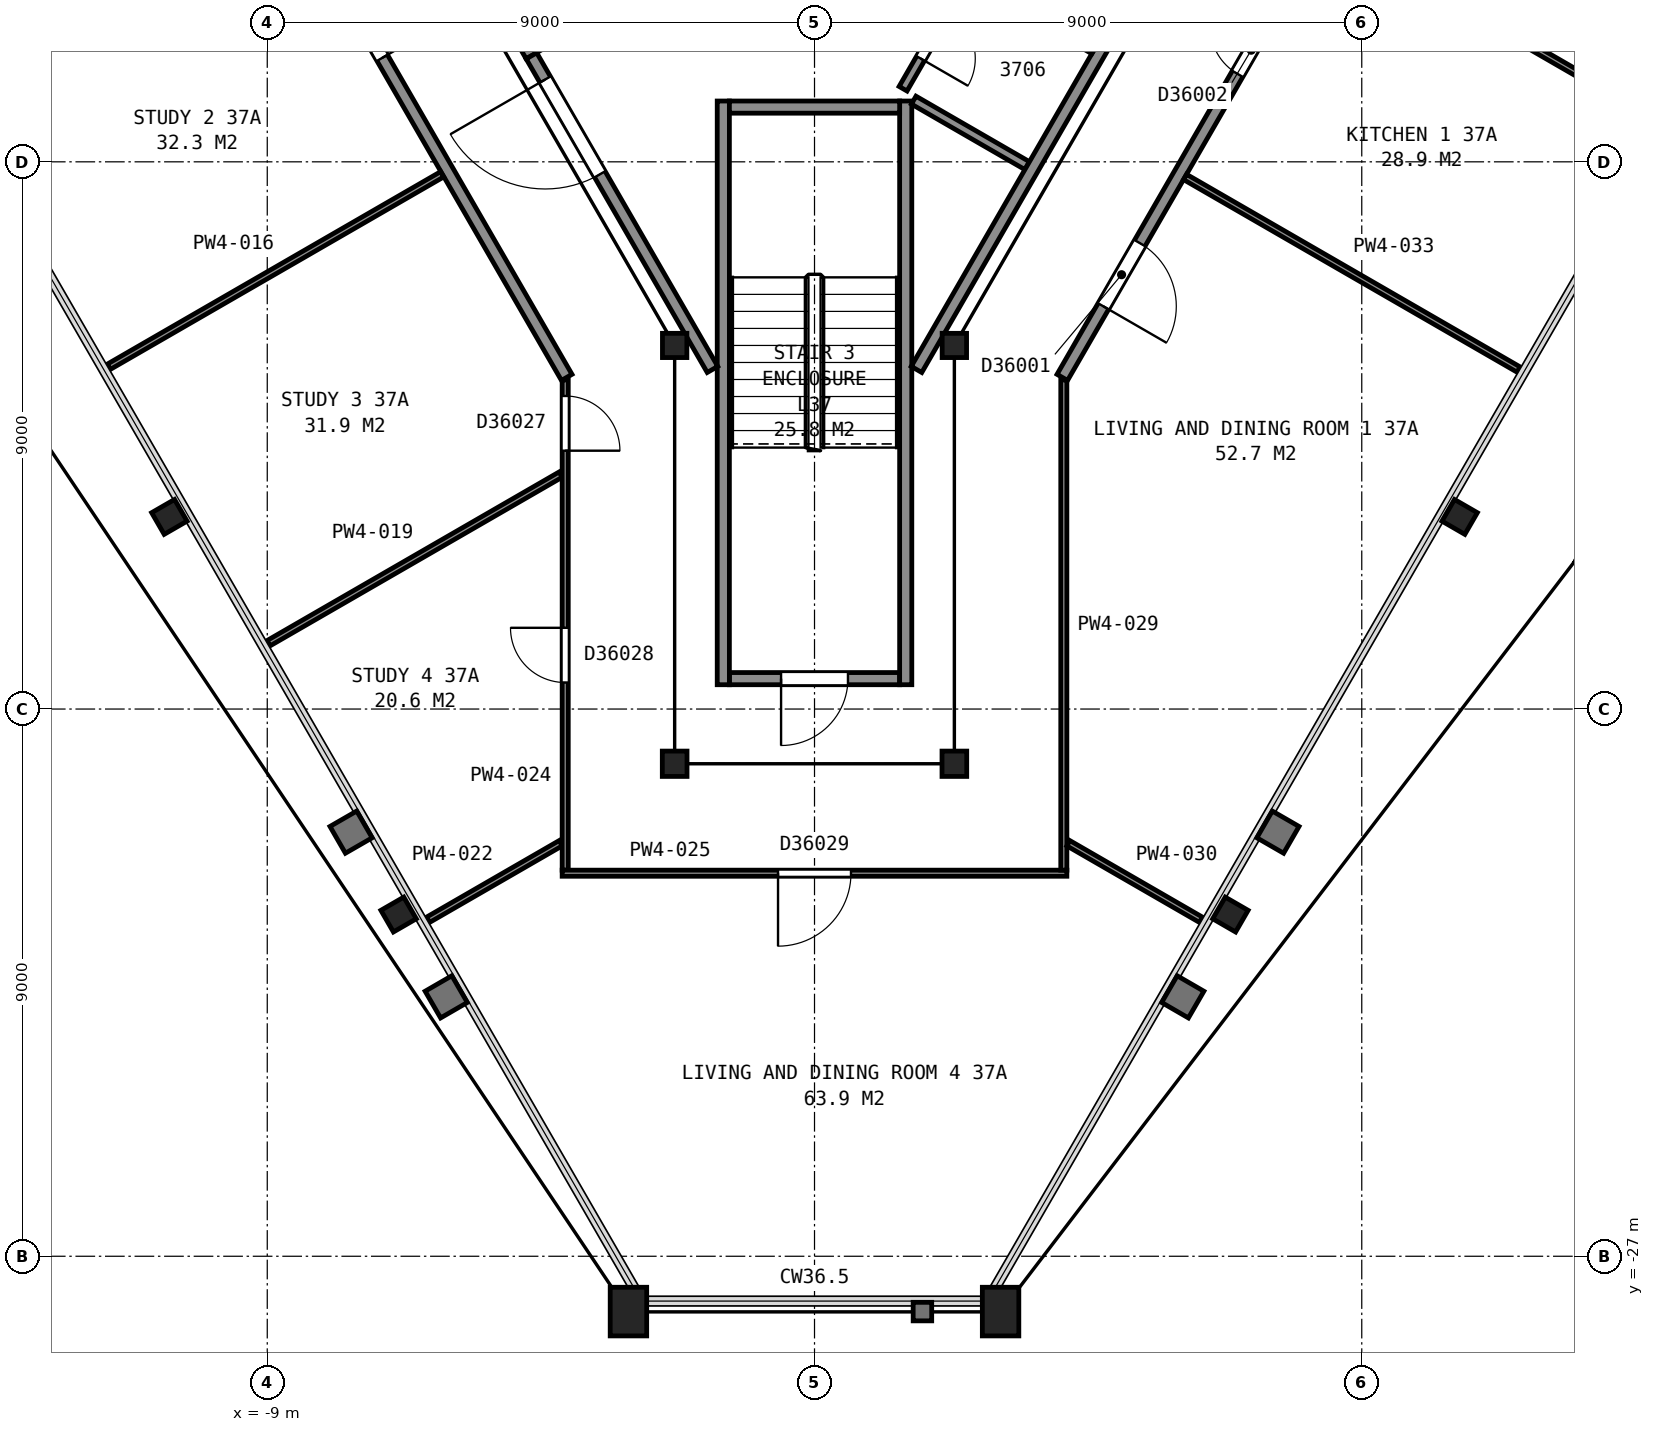
"""IFC4 building model, lengths in metres.
Left out: names, types, materials, properties, quantities, classifications, styles, units other than length and angle.
Written with IfcOpenShell. Run it as: python <this file> out.ifc"""

import sys

from ifc_helpers import new_model, si_unit, direction, frame, frame_2d, origin, origin_2d, place, context, subcontext, project, spatial, rectangle, hollow_rectangle, i_section, extrude, element, fill, save


model = new_model("IFC4")
c1 = context("Model", 3, precision=1e-05, world=origin(), true_north=direction((0.0, 1.0)))
c2 = subcontext(c1, "Body", "Model", "MODEL_VIEW")
j1 = project(units=[si_unit("LENGTHUNIT", "METRE"), si_unit("PLANEANGLEUNIT", "RADIAN")], contexts=[c1])
p1 = place(None, origin())
s1 = spatial("IfcSite", under=j1, at=p1, CompositionType="ELEMENT")
p2 = place(p1, origin())
s2 = spatial("IfcBuilding", under=s1, at=p2, CompositionType="ELEMENT")
p3 = place(p2, frame((0.0, 0.0, 152.5)))
s3 = spatial("IfcBuildingStorey", under=s2, at=p3, CompositionType="ELEMENT", Elevation=152.5)
p4 = place(p3, frame((-10.61, -14.84, 0.0), z_axis=(0.0, 0.0, 1.0), x_axis=(-0.5, 0.866025403784, 0.0)))
e1 = element("IfcColumn", 1, at=p4, inside=s3, PredefinedType="COLUMN", context=c2, shape_type="SweptSolid", body=[
    extrude(i_section(OverallWidth=0.411, OverallDepth=0.434, WebThickness=0.036, FlangeThickness=0.057, FilletRadius=0.015, at=origin_2d()), origin(), (0.0, 0.0, 1.0), 3.665),
])
p5 = place(p3, frame((-6.84, -21.38, 0.0), z_axis=(0.0, 0.0, 1.0), x_axis=(-0.5, 0.866025403784, 0.0)))
e2 = element("IfcColumn", 2, at=p5, inside=s3, PredefinedType="COLUMN", context=c2, shape_type="SweptSolid", body=[
    extrude(i_section(OverallWidth=0.411, OverallDepth=0.434, WebThickness=0.036, FlangeThickness=0.057, FilletRadius=0.015, at=origin_2d()), origin(), (0.0, 0.0, 1.0), 3.66),
])
for number, where, z_axis, x_axis in (
    (3, (-3.06, -27.91, 0.0), (0.0, 0.0, 1.0), (-1.0, 0.0, 0.0)),
    (4, (3.06, -27.91, 0.0), (0.0, 0.0, 1.0), (-1.0, 0.0, 0.0)),
):
    element("IfcColumn", number, at=place(p3, frame(where, z_axis=z_axis, x_axis=x_axis)), inside=s3, PredefinedType="COLUMN", context=c2, shape_type="SweptSolid", body=[
        extrude(hollow_rectangle(XDim=0.6, YDim=0.8, WallThickness=0.05, at=origin_2d()), origin(), (0.0, 0.0, 1.0), 3.635),
    ])
p6 = place(p3, frame((6.84, -21.38, 0.0), z_axis=(0.0, 0.0, 1.0), x_axis=(-0.5, -0.866025403784, 0.0)))
e5 = element("IfcColumn", 5, at=p6, inside=s3, PredefinedType="COLUMN", context=c2, shape_type="SweptSolid", body=[
    extrude(i_section(OverallWidth=0.411, OverallDepth=0.434, WebThickness=0.036, FlangeThickness=0.057, FilletRadius=0.015, at=origin_2d()), origin(), (0.0, 0.0, 1.0), 3.66),
])
p7 = place(p3, frame((10.61, -14.84, 0.0), z_axis=(0.0, 0.0, 1.0), x_axis=(-0.5, -0.866025403784, 0.0)))
e6 = element("IfcColumn", 6, at=p7, inside=s3, PredefinedType="COLUMN", context=c2, shape_type="SweptSolid", body=[
    extrude(i_section(OverallWidth=0.411, OverallDepth=0.434, WebThickness=0.036, FlangeThickness=0.057, FilletRadius=0.015, at=origin_2d()), origin(), (0.0, 0.0, 1.0), 3.665),
])
p8 = place(p3, frame((-2.3, -12.02, 0.0), z_axis=(0.0, 0.0, 1.0), x_axis=(1.0, 0.0, 0.0)))
e7 = element("IfcColumn", 7, at=p8, inside=s3, PredefinedType="COLUMN", context=c2, shape_type="SweptSolid", body=[
    extrude(i_section(OverallWidth=0.401, OverallDepth=0.399, WebThickness=0.025, FlangeThickness=0.04, FilletRadius=0.015, at=origin_2d()), origin(), (0.0, 0.0, 1.0), 3.7),
])
for number, where, z_axis, x_axis in (
    (8, (-2.3, -18.9, 0.0), (0.0, 0.0, 1.0), (-1.0, 0.0, 0.0)),
    (9, (2.3, -18.9, 0.0), (0.0, 0.0, 1.0), (-1.0, 0.0, 0.0)),
):
    element("IfcColumn", number, at=place(p3, frame(where, z_axis=z_axis, x_axis=x_axis)), inside=s3, PredefinedType="COLUMN", context=c2, shape_type="SweptSolid", body=[
        extrude(i_section(OverallWidth=0.406, OverallDepth=0.417, WebThickness=0.03, FlangeThickness=0.048, FilletRadius=0.015, at=origin_2d()), origin(), (0.0, 0.0, 1.0), 3.7),
    ])
p9 = place(p3, frame((2.3, -12.02, 0.0), z_axis=(0.0, 0.0, 1.0), x_axis=(1.0, 0.0, 0.0)))
e10 = element("IfcColumn", 10, at=p9, inside=s3, PredefinedType="COLUMN", context=c2, shape_type="SweptSolid", body=[
    extrude(i_section(OverallWidth=0.401, OverallDepth=0.399, WebThickness=0.025, FlangeThickness=0.04, FilletRadius=0.015, at=origin_2d()), origin(), (0.0, 0.0, 1.0), 3.7),
])
p10 = place(p3, frame((-1.4, -17.5, 0.0), z_axis=(0.0, 0.0, 1.0), x_axis=(1.0, 0.0, 0.0)))
e11 = element("IfcWall", 11, at=p10, inside=s3, PredefinedType="PARTITIONING", context=c2, shape_type="SweptSolid", body=[
    extrude(rectangle(XDim=2.8, YDim=0.2, at=frame_2d((1.4, 0.0))), origin(), (0.0, 0.0, 1.0), 3.45),
])
p11 = place(p10, frame((0.85, 0.0, 0.0)))
e12 = element("IfcOpeningElement", 12, at=p11, cuts=e11, PredefinedType="OPENING", context=c2, shape_type="SweptSolid", body=[
    extrude(rectangle(XDim=1.1, YDim=2.1, at=frame_2d((0.55, 1.05))), frame((0.0, 0.11, 0.0), z_axis=(0.0, -1.0, 0.0), x_axis=(1.0, 0.0, 0.0)), (0.0, 0.0, 1.0), 0.22),
])
for number, where, z_axis, x_axis in (
    (13, (1.5, -8.0, 0.0), (0.0, 0.0, 1.0), (0.0, -1.0, 0.0)),
    (14, (-1.5, -8.0, 0.0), (0.0, 0.0, 1.0), (0.0, -1.0, 0.0)),
):
    element("IfcWall", number, at=place(p3, frame(where, z_axis=z_axis, x_axis=x_axis)), inside=s3, PredefinedType="PARTITIONING", context=c2, shape_type="SweptSolid", body=[
        extrude(rectangle(XDim=9.6, YDim=0.2, at=frame_2d((4.8, 0.0))), origin(), (0.0, 0.0, 1.0), 3.45),
    ])
p12 = place(p3, frame((-1.4, -8.1, 0.0), z_axis=(0.0, 0.0, 1.0), x_axis=(1.0, 0.0, 0.0)))
e15 = element("IfcWall", 15, at=p12, inside=s3, PredefinedType="PARTITIONING", context=c2, shape_type="SweptSolid", body=[
    extrude(rectangle(XDim=2.8, YDim=0.2, at=frame_2d((1.4, 0.0))), origin(), (0.0, 0.0, 1.0), 3.45),
])
p13 = place(p3, frame((-4.62, -7.118, 0.0), z_axis=(0.0, 0.0, 1.0), x_axis=(0.866036909293, 0.499980071345, 0.0)))
e16 = element("IfcWall", 16, at=p13, inside=s3, PredefinedType="PARTITIONING", context=c2, shape_type="SweptSolid", body=[
    extrude(rectangle(XDim=1.75, YDim=0.2, at=frame_2d((0.875, 0.0))), origin(), (0.0, 0.0, 1.0), 3.7),
])
p14 = place(p3, frame((-4.656, -7.255, 0.0), z_axis=(0.0, 0.0, 1.0), x_axis=(-0.499990435942, 0.866030925526, 0.0)))
e17 = element("IfcWall", 17, at=p14, inside=s3, PredefinedType="PARTITIONING", context=c2, shape_type="SweptSolid", body=[
    extrude(rectangle(XDim=2.55, YDim=0.2, at=frame_2d((1.275, 0.0))), origin(), (0.0, 0.0, 1.0), 3.7),
])
p15 = place(p3, frame((-4.655, -7.257, 0.0), z_axis=(0.0, 0.0, 1.0), x_axis=(0.499966124405, -0.866044960985, 0.0)))
e18 = element("IfcWall", 18, at=p15, inside=s3, PredefinedType="PARTITIONING", context=c2, shape_type="SweptSolid", body=[
    extrude(rectangle(XDim=5.956, YDim=0.2, at=frame_2d((2.978, 0.0))), origin(), (0.0, 0.0, 1.0), 3.45),
])
p16 = place(p15, frame((0.45, 0.0, 0.0)))
e19 = element("IfcOpeningElement", 19, at=p16, cuts=e18, PredefinedType="OPENING", context=c2, shape_type="SweptSolid", body=[
    extrude(rectangle(XDim=1.8, YDim=2.1, at=frame_2d((0.9, 1.05))), frame((0.0, 0.11, 0.0), z_axis=(0.0, -1.0, 0.0), x_axis=(1.0, 0.0, 0.0)), (0.0, 0.0, 1.0), 0.22),
])
p17 = place(p3, frame((2.481, -6.022, 0.0), z_axis=(0.0, 0.0, 1.0), x_axis=(-0.499801470403, -0.866139994564, 0.0)))
e20 = element("IfcWall", 20, at=p17, inside=s3, PredefinedType="PARTITIONING", context=c2, shape_type="SweptSolid", body=[
    extrude(rectangle(XDim=2.051, YDim=0.15, at=frame_2d((1.025, 0.0))), origin(), (0.0, 0.0, 1.0), 3.45),
])
p18 = place(p17, frame((0.576, 0.0, 0.0)))
e21 = element("IfcOpeningElement", 21, at=p18, cuts=e20, PredefinedType="OPENING", context=c2, shape_type="SweptSolid", body=[
    extrude(rectangle(XDim=0.9, YDim=2.1, at=frame_2d((0.45, 1.05))), frame((0.0, 0.085, 0.0), z_axis=(0.0, -1.0, 0.0), x_axis=(1.0, 0.0, 0.0)), (0.0, 0.0, 1.0), 0.17),
])
p19 = place(p3, frame((1.631, -7.986, 0.0), z_axis=(0.0, 0.0, 1.0), x_axis=(0.866038426532, -0.499977443261, 0.0)))
e22 = element("IfcWall", 22, at=p19, inside=s3, PredefinedType="PARTITIONING", context=c2, shape_type="SweptSolid", body=[
    extrude(rectangle(XDim=2.155, YDim=0.15, at=frame_2d((1.077, 0.0))), origin(), (0.0, 0.0, 1.0), 3.45),
])
p20 = place(p3, frame((1.677, -12.415, 0.0), z_axis=(0.0, 0.0, 1.0), x_axis=(0.500054337157, 0.865994029939, 0.0)))
e23 = element("IfcWall", 23, at=p20, inside=s3, PredefinedType="PARTITIONING", context=c2, shape_type="SweptSolid", body=[
    extrude(rectangle(XDim=6.177, YDim=0.2, at=frame_2d((3.088, 0.0))), origin(), (0.0, 0.0, 1.0), 3.45),
])
p21 = place(p3, frame((2.454, -5.919, 0.0), z_axis=(0.0, 0.0, 1.0), x_axis=(0.866006523861, -0.500032699561, 0.0)))
e24 = element("IfcWall", 24, at=p21, inside=s3, PredefinedType="PARTITIONING", context=c2, shape_type="SweptSolid", body=[
    extrude(rectangle(XDim=2.475, YDim=0.15, at=frame_2d((1.237, 0.0))), origin(), (0.0, 0.0, 1.0), 3.45),
])
p22 = place(p3, frame((-14.23, -7.823, 0.0), z_axis=(0.0, 0.0, 1.0), x_axis=(0.866021249958, 0.50000719457, 0.0)))
e25 = element("IfcWall", 25, at=p22, inside=s3, PredefinedType="PARTITIONING", context=c2, shape_type="SweptSolid", body=[
    extrude(rectangle(XDim=6.333, YDim=0.1, at=frame_2d((3.167, 0.0))), origin(), (0.0, 0.0, 1.0), 2.713),
])
p23 = place(p3, frame((-4.075, -12.545, 0.0), z_axis=(0.0, 0.0, 1.0), x_axis=(-0.499999743747, 0.866025551732, 0.0)))
e26 = element("IfcWall", 26, at=p23, inside=s3, PredefinedType="PARTITIONING", context=c2, shape_type="SweptSolid", body=[
    extrude(rectangle(XDim=17.656, YDim=0.2, at=frame_2d((8.828, 0.0))), origin(), (0.0, 0.0, 1.0), 2.713),
])
p24 = place(p23, frame((10.08, 0.0, 0.0)))
e27 = element("IfcOpeningElement", 27, at=p24, cuts=e26, PredefinedType="OPENING", context=c2, shape_type="SweptSolid", body=[
    extrude(rectangle(XDim=0.9, YDim=2.1, at=frame_2d((0.45, 1.05))), frame((0.0, 0.11, 0.0), z_axis=(0.0, -1.0, 0.0), x_axis=(1.0, 0.0, 0.0)), (0.0, 0.0, 1.0), 0.22),
])
p25 = place(p23, frame((6.068, 0.0, 0.0)))
e28 = element("IfcOpeningElement", 28, at=p25, cuts=e26, PredefinedType="OPENING", context=c2, shape_type="SweptSolid", body=[
    extrude(rectangle(XDim=0.9, YDim=2.1, at=frame_2d((0.45, 1.05))), frame((0.0, 0.11, 0.0), z_axis=(0.0, -1.0, 0.0), x_axis=(1.0, 0.0, 0.0)), (0.0, 0.0, 1.0), 0.22),
])
p26 = place(p3, frame((-11.605, -12.37, 0.0), z_axis=(0.0, 0.0, 1.0), x_axis=(0.866017278078, 0.500014073873, 0.0)))
e29 = element("IfcWall", 29, at=p26, inside=s3, PredefinedType="PARTITIONING", context=c2, shape_type="SweptSolid", body=[
    extrude(rectangle(XDim=6.329, YDim=0.1, at=frame_2d((3.165, 0.0))), origin(), (0.0, 0.0, 1.0), 2.713),
])
p27 = place(p3, frame((-8.979, -16.918, 0.0), z_axis=(0.0, 0.0, 1.0), x_axis=(0.866046339293, 0.499963736882, 0.0)))
e30 = element("IfcWall", 30, at=p27, inside=s3, PredefinedType="PARTITIONING", context=c2, shape_type="SweptSolid", body=[
    extrude(rectangle(XDim=5.547, YDim=0.1, at=frame_2d((2.774, 0.0))), origin(), (0.0, 0.0, 1.0), 2.713),
])
p28 = place(p3, frame((-6.354, -21.465, 0.0), z_axis=(0.0, 0.0, 1.0), x_axis=(0.866061165757, 0.499938053331, 0.0)))
e31 = element("IfcWall", 31, at=p28, inside=s3, PredefinedType="PARTITIONING", context=c2, shape_type="SweptSolid", body=[
    extrude(rectangle(XDim=2.516, YDim=0.1, at=frame_2d((1.258, 0.0))), origin(), (0.0, 0.0, 1.0), 2.713),
])
p29 = place(p3, frame((-4.1, -20.65, 0.0), z_axis=(0.0, 0.0, 1.0), x_axis=(0.0, 1.0, 0.0)))
e32 = element("IfcWall", 32, at=p29, inside=s3, PredefinedType="PARTITIONING", context=c2, shape_type="SweptSolid", body=[
    extrude(rectangle(XDim=8.063, YDim=0.1, at=frame_2d((4.031, 0.0))), origin(), (0.0, 0.0, 1.0), 2.713),
])
p30 = place(p29, frame((6.899, 0.0, 0.0)))
e33 = element("IfcOpeningElement", 33, at=p30, cuts=e32, PredefinedType="OPENING", context=c2, shape_type="SweptSolid", body=[
    extrude(rectangle(XDim=0.9, YDim=2.1, at=frame_2d((0.45, 1.05))), frame((0.0, 0.06, 0.0), z_axis=(0.0, -1.0, 0.0), x_axis=(1.0, 0.0, 0.0)), (0.0, 0.0, 1.0), 0.12),
])
p31 = place(p29, frame((3.086, 0.0, 0.0)))
e34 = element("IfcOpeningElement", 34, at=p31, cuts=e32, PredefinedType="OPENING", context=c2, shape_type="SweptSolid", body=[
    extrude(rectangle(XDim=0.9, YDim=2.1, at=frame_2d((0.45, 1.05))), frame((0.0, 0.06, 0.0), z_axis=(0.0, -1.0, 0.0), x_axis=(1.0, 0.0, 0.0)), (0.0, 0.0, 1.0), 0.12),
])
p32 = place(p3, frame((4.15, -20.7, 0.0), z_axis=(0.0, 0.0, 1.0), x_axis=(-1.0, 0.0, 0.0)))
e35 = element("IfcWall", 35, at=p32, inside=s3, PredefinedType="PARTITIONING", context=c2, shape_type="SweptSolid", body=[
    extrude(rectangle(XDim=8.3, YDim=0.1, at=frame_2d((4.15, 0.0))), origin(), (0.0, 0.0, 1.0), 2.713),
])
p33 = place(p32, frame((3.55, 0.0, 0.0)))
e36 = element("IfcOpeningElement", 36, at=p33, cuts=e35, PredefinedType="OPENING", context=c2, shape_type="SweptSolid", body=[
    extrude(rectangle(XDim=1.2, YDim=2.1, at=frame_2d((0.6, 1.05))), frame((0.0, 0.06, 0.0), z_axis=(0.0, -1.0, 0.0), x_axis=(1.0, 0.0, 0.0)), (0.0, 0.0, 1.0), 0.12),
])
p34 = place(p3, frame((4.1, -20.65, 0.0), z_axis=(0.0, 0.0, 1.0), x_axis=(0.0, 1.0, 0.0)))
e37 = element("IfcWall", 37, at=p34, inside=s3, PredefinedType="PARTITIONING", context=c2, shape_type="SweptSolid", body=[
    extrude(rectangle(XDim=8.063, YDim=0.1, at=frame_2d((4.031, 0.0))), origin(), (0.0, 0.0, 1.0), 2.713),
])
p35 = place(p3, frame((4.175, -20.207, 0.0), z_axis=(0.0, 0.0, 1.0), x_axis=(0.866061165757, -0.499938053331, 0.0)))
e38 = element("IfcWall", 38, at=p35, inside=s3, PredefinedType="PARTITIONING", context=c2, shape_type="SweptSolid", body=[
    extrude(rectangle(XDim=2.516, YDim=0.1, at=frame_2d((1.258, 0.0))), origin(), (0.0, 0.0, 1.0), 2.713),
])
p36 = place(p3, frame((12.928, 2.789, 0.0), z_axis=(0.0, 0.0, 1.0), x_axis=(-0.499997769292, -0.86602669168, 0.0)))
e39 = element("IfcWall", 39, at=p36, inside=s3, PredefinedType="PARTITIONING", context=c2, shape_type="SweptSolid", body=[
    extrude(rectangle(XDim=17.706, YDim=0.2, at=frame_2d((8.853, 0.0))), origin(), (0.0, 0.0, 1.0), 2.713),
])
p37 = place(p36, frame((15.156, 0.0, 0.0)))
e40 = element("IfcOpeningElement", 40, at=p37, cuts=e39, PredefinedType="OPENING", context=c2, shape_type="SweptSolid", body=[
    extrude(rectangle(XDim=1.2, YDim=2.1, at=frame_2d((0.6, 1.05))), frame((0.0, 0.11, 0.0), z_axis=(0.0, -1.0, 0.0), x_axis=(1.0, 0.0, 0.0)), (0.0, 0.0, 1.0), 0.22),
])
p38 = place(p36, frame((11.042, 0.0, 0.0)))
e41 = element("IfcOpeningElement", 41, at=p38, cuts=e39, PredefinedType="OPENING", context=c2, shape_type="SweptSolid", body=[
    extrude(rectangle(XDim=0.9, YDim=2.1, at=frame_2d((0.45, 1.05))), frame((0.0, 0.11, 0.0), z_axis=(0.0, -1.0, 0.0), x_axis=(1.0, 0.0, 0.0)), (0.0, 0.0, 1.0), 0.22),
])
p39 = place(p36, frame((7.14, 0.0, 0.0)))
e42 = element("IfcOpeningElement", 42, at=p39, cuts=e39, PredefinedType="OPENING", context=c2, shape_type="SweptSolid", body=[
    extrude(rectangle(XDim=0.9, YDim=2.1, at=frame_2d((0.45, 1.05))), frame((0.0, 0.11, 0.0), z_axis=(0.0, -1.0, 0.0), x_axis=(1.0, 0.0, 0.0)), (0.0, 0.0, 1.0), 0.22),
])
p40 = place(p36, frame((0.515, 0.0, 0.0)))
e43 = element("IfcOpeningElement", 43, at=p40, cuts=e39, PredefinedType="OPENING", context=c2, shape_type="SweptSolid", body=[
    extrude(rectangle(XDim=0.9, YDim=2.1, at=frame_2d((0.45, 1.05))), frame((0.0, 0.11, 0.0), z_axis=(0.0, -1.0, 0.0), x_axis=(1.0, 0.0, 0.0)), (0.0, 0.0, 1.0), 0.22),
])
for number, where, z_axis, x_axis in (
    (44, (6.094, -9.249, 0.0), (0.0, 0.0, 1.0), (0.866, -0.5, 0.0)),
    (45, (8.445, -5.177, 0.0), (0.0, 0.0, 1.0), (0.866, -0.5, 0.0)),
):
    element("IfcWall", number, at=place(p3, frame(where, z_axis=z_axis, x_axis=x_axis)), inside=s3, PredefinedType="PARTITIONING", context=c2, shape_type="SweptSolid", body=[
        extrude(rectangle(XDim=6.333, YDim=0.1, at=frame_2d((3.167, 0.0))), origin(), (0.0, 0.0, 1.0), 2.713),
    ])
p41 = place(p11, origin())
e46 = element("IfcDoor", 46, at=p41, inside=s3, OperationType="SINGLE_SWING_LEFT", PredefinedType="DOOR", context=c2, shape_type="SweptSolid", body=[
    extrude(rectangle(XDim=1.1, YDim=2.1, at=frame_2d((0.55, 1.05))), frame((0.0, 0.025, 0.0), z_axis=(0.0, -1.0, 0.0), x_axis=(1.0, 0.0, 0.0)), (0.0, 0.0, 1.0), 0.05),
])
fill(e12, e46)
p42 = place(p16, origin())
e47 = element("IfcDoor", 47, at=p42, inside=s3, OperationType="DOUBLE_DOOR_SINGLE_SWING", PredefinedType="DOOR", context=c2, shape_type="SweptSolid", body=[
    extrude(rectangle(XDim=1.8, YDim=2.1, at=frame_2d((0.9, 1.05))), frame((0.0, 0.025, 0.0), z_axis=(0.0, -1.0, 0.0), x_axis=(1.0, 0.0, 0.0)), (0.0, 0.0, 1.0), 0.05),
])
fill(e19, e47)
p43 = place(p18, origin())
e48 = element("IfcDoor", 48, at=p43, inside=s3, OperationType="SINGLE_SWING_RIGHT", PredefinedType="DOOR", context=c2, shape_type="SweptSolid", body=[
    extrude(rectangle(XDim=0.9, YDim=2.1, at=frame_2d((0.45, 1.05))), frame((0.0, 0.025, 0.0), z_axis=(0.0, -1.0, 0.0), x_axis=(1.0, 0.0, 0.0)), (0.0, 0.0, 1.0), 0.05),
])
fill(e21, e48)
p44 = place(p25, origin())
e49 = element("IfcDoor", 49, at=p44, inside=s3, OperationType="SINGLE_SWING_LEFT", PredefinedType="DOOR", context=c2, shape_type="SweptSolid", body=[
    extrude(rectangle(XDim=0.9, YDim=2.1, at=frame_2d((0.45, 1.05))), frame((0.0, 0.025, 0.0), z_axis=(0.0, -1.0, 0.0), x_axis=(1.0, 0.0, 0.0)), (0.0, 0.0, 1.0), 0.05),
])
fill(e28, e49)
p45 = place(p30, origin())
e50 = element("IfcDoor", 50, at=p45, inside=s3, OperationType="SINGLE_SWING_LEFT", PredefinedType="DOOR", context=c2, shape_type="SweptSolid", body=[
    extrude(rectangle(XDim=0.9, YDim=2.1, at=frame_2d((0.45, 1.05))), frame((0.0, 0.025, 0.0), z_axis=(0.0, -1.0, 0.0), x_axis=(1.0, 0.0, 0.0)), (0.0, 0.0, 1.0), 0.05),
])
fill(e33, e50)
p46 = place(p31, origin())
e51 = element("IfcDoor", 51, at=p46, inside=s3, OperationType="SINGLE_SWING_RIGHT", PredefinedType="DOOR", context=c2, shape_type="SweptSolid", body=[
    extrude(rectangle(XDim=0.9, YDim=2.1, at=frame_2d((0.45, 1.05))), frame((0.0, 0.025, 0.0), z_axis=(0.0, -1.0, 0.0), x_axis=(1.0, 0.0, 0.0)), (0.0, 0.0, 1.0), 0.05),
])
fill(e34, e51)
p47 = place(p33, origin())
e52 = element("IfcDoor", 52, at=p47, inside=s3, OperationType="SINGLE_SWING_RIGHT", PredefinedType="DOOR", context=c2, shape_type="SweptSolid", body=[
    extrude(rectangle(XDim=1.2, YDim=2.1, at=frame_2d((0.6, 1.05))), frame((0.0, 0.025, 0.0), z_axis=(0.0, -1.0, 0.0), x_axis=(1.0, 0.0, 0.0)), (0.0, 0.0, 1.0), 0.05),
])
fill(e36, e52)
p48 = place(p37, origin())
e53 = element("IfcDoor", 53, at=p48, inside=s3, OperationType="SINGLE_SWING_RIGHT", PredefinedType="DOOR", context=c2, shape_type="SweptSolid", body=[
    extrude(rectangle(XDim=1.2, YDim=2.1, at=frame_2d((0.6, 1.05))), frame((0.0, 0.025, 0.0), z_axis=(0.0, -1.0, 0.0), x_axis=(1.0, 0.0, 0.0)), (0.0, 0.0, 1.0), 0.05),
])
fill(e40, e53)
p49 = place(p38, origin())
e54 = element("IfcDoor", 54, at=p49, inside=s3, OperationType="SINGLE_SWING_LEFT", PredefinedType="DOOR", context=c2, shape_type="SweptSolid", body=[
    extrude(rectangle(XDim=0.9, YDim=2.1, at=frame_2d((0.45, 1.05))), frame((0.0, 0.025, 0.0), z_axis=(0.0, -1.0, 0.0), x_axis=(1.0, 0.0, 0.0)), (0.0, 0.0, 1.0), 0.05),
])
fill(e41, e54)
save(model, sys.argv[1])
